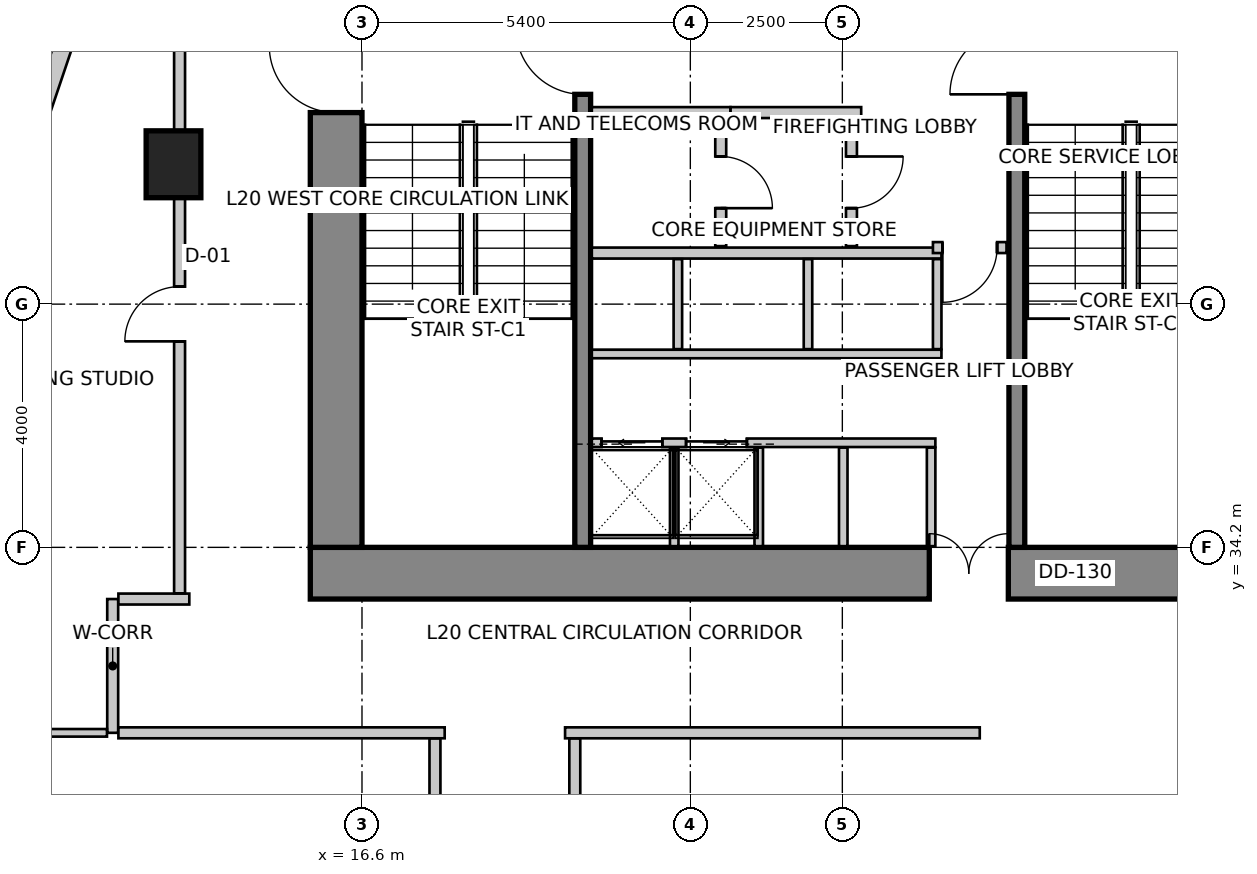
"""IFC4 building model, lengths in metres.
Left out: names, types, materials, properties, quantities, classifications, styles, units other than length and angle.
Written with IfcOpenShell. Run it as: python <this file> out.ifc"""

import sys

from ifc_helpers import new_model, si_unit, direction, frame, frame_2d, origin, origin_2d, place, context, subcontext, project, spatial, rectangle, extrude, source, transform, mapped, element, fill, save


model = new_model("IFC4")
c1 = context("Model", 3, precision=1e-05, world=origin(), true_north=direction((0.0, 1.0)))
c2 = subcontext(c1, "Body", "Model", "MODEL_VIEW")
j1 = project(units=[si_unit("LENGTHUNIT", "METRE"), si_unit("PLANEANGLEUNIT", "RADIAN")], contexts=[c1])
p1 = place(None, origin())
s1 = spatial("IfcSite", under=j1, at=p1, CompositionType="ELEMENT")
p2 = place(p1, origin())
s2 = spatial("IfcBuilding", under=s1, at=p2, CompositionType="ELEMENT")
p3 = place(p2, frame((0.0, 0.0, 83.0)))
s3 = spatial("IfcBuildingStorey", under=s2, at=p3, CompositionType="ELEMENT", Elevation=83.0)
p4 = place(p3, frame((15.75, 33.775, 0.0), z_axis=(0.0, 0.0, 1.0), x_axis=(1.0, 0.0, 0.0)))
e1 = element("IfcWall", 1, at=p4, inside=s3, PredefinedType="SHEAR", context=c2, shape_type="SweptSolid", body=[
    extrude(rectangle(XDim=16.1, YDim=0.85, at=frame_2d((8.05, 0.0))), origin(), (0.0, 0.0, 1.0), 4.0),
])
m1 = source(origin(), c2, "Body", "SweptSolid", [
    extrude(rectangle(XDim=1.3, YDim=2.15, at=frame_2d((0.65, 1.075))), frame((0.0, 0.435, 0.0), z_axis=(0.0, -1.0, 0.0), x_axis=(1.0, 0.0, 0.0)), (0.0, 0.0, 1.0), 0.87),
])
p5 = place(p4, frame((10.18, 0.0, 0.0)))
e2 = element("IfcOpeningElement", 2, at=p5, cuts=e1, PredefinedType="OPENING", context=c2, shape_type="MappedRepresentation", body=[
    mapped(m1, transform((0.0, 0.0, 0.0), scale=1.0)),
])
p6 = place(p3, frame((16.175, 34.2, 0.0), z_axis=(0.0, 0.0, 1.0), x_axis=(0.0, 1.0, 0.0)))
e3 = element("IfcWall", 3, at=p6, inside=s3, PredefinedType="SHEAR", context=c2, shape_type="SweptSolid", body=[
    extrude(rectangle(XDim=11.4, YDim=0.85, at=frame_2d((5.7, 0.0))), origin(), (0.0, 0.0, 1.0), 4.0),
])
m2 = source(origin(), c2, "Body", "SweptSolid", [
    extrude(rectangle(XDim=1.1, YDim=2.15, at=frame_2d((0.55, 1.075))), frame((0.0, 0.435, 0.0), z_axis=(0.0, -1.0, 0.0), x_axis=(1.0, 0.0, 0.0)), (0.0, 0.0, 1.0), 0.87),
])
p7 = place(p6, frame((7.15, 0.0, 0.0)))
e4 = element("IfcOpeningElement", 4, at=p7, cuts=e3, PredefinedType="OPENING", context=c2, shape_type="MappedRepresentation", body=[
    mapped(m2, transform((0.0, 0.0, 0.0), scale=1.0)),
])
p8 = place(p3, frame((20.23, 34.2, 0.0), z_axis=(0.0, 0.0, 1.0), x_axis=(0.0, 1.0, 0.0)))
e5 = element("IfcWall", 5, at=p8, inside=s3, PredefinedType="SHEAR", context=c2, shape_type="SweptSolid", body=[
    extrude(rectangle(XDim=9.06, YDim=0.26, at=frame_2d((4.53, 0.0))), origin(), (0.0, 0.0, 1.0), 4.0),
])
m3 = source(origin(), c2, "Body", "SweptSolid", [
    extrude(rectangle(XDim=1.1, YDim=2.15, at=frame_2d((0.55, 1.075))), frame((0.0, 0.14, 0.0), z_axis=(0.0, -1.0, 0.0), x_axis=(1.0, 0.0, 0.0)), (0.0, 0.0, 1.0), 0.28),
])
p9 = place(p8, frame((7.45, 0.0, 0.0)))
e6 = element("IfcOpeningElement", 6, at=p9, cuts=e5, PredefinedType="OPENING", context=c2, shape_type="MappedRepresentation", body=[
    mapped(m3, transform((0.0, 0.0, 0.0), scale=1.0)),
])
p10 = place(p3, frame((27.37, 34.2, 0.0), z_axis=(0.0, 0.0, 1.0), x_axis=(0.0, 1.0, 0.0)))
e7 = element("IfcWall", 7, at=p10, inside=s3, PredefinedType="SHEAR", context=c2, shape_type="SweptSolid", body=[
    extrude(rectangle(XDim=9.06, YDim=0.26, at=frame_2d((4.53, 0.0))), origin(), (0.0, 0.0, 1.0), 4.0),
])
p11 = place(p10, frame((7.45, 0.0, 0.0)))
e8 = element("IfcOpeningElement", 8, at=p11, cuts=e7, PredefinedType="OPENING", context=c2, shape_type="MappedRepresentation", body=[
    mapped(m3, transform((0.0, 0.0, 0.0), scale=1.0)),
])
m4 = source(origin(), c2, "Body", "SweptSolid", [
    extrude(rectangle(XDim=0.9, YDim=1.1, at=origin_2d()), origin(), (0.0, 0.0, 1.0), 4.0),
])
p12 = place(p3, frame((13.5, 40.5, 0.0), z_axis=(0.0, 0.0, 1.0), x_axis=(1.0, 0.0, 0.0)))
e9 = element("IfcColumn", 9, at=p12, inside=s3, PredefinedType="COLUMN", context=c2, shape_type="MappedRepresentation", body=[
    mapped(m4, transform((0.0, 0.0, 0.0), scale=1.0)),
])
p13 = place(p3, frame((13.269, 47.134, 0.0), z_axis=(0.0, 0.0, 1.0), x_axis=(-0.319920423265, -0.947444416722, 0.0)))
e10 = element("IfcWall", 10, at=p13, inside=s3, PredefinedType="SOLIDWALL", context=c2, shape_type="SweptSolid", body=[
    extrude(rectangle(XDim=16.135, YDim=0.3, at=frame_2d((8.067, 0.0))), origin(), (0.0, 0.0, 1.0), 3.75),
])
m5 = source(origin(), c2, "Body", "SweptSolid", [
    extrude(rectangle(XDim=2.8, YDim=2.4, at=frame_2d((1.4, 1.2))), frame((0.0, 0.16, 0.0), z_axis=(0.0, -1.0, 0.0), x_axis=(1.0, 0.0, 0.0)), (0.0, 0.0, 1.0), 0.32),
])
p14 = place(p13, frame((1.988, 0.0, 0.85)))
e11 = element("IfcOpeningElement", 11, at=p14, cuts=e10, PredefinedType="OPENING", context=c2, shape_type="MappedRepresentation", body=[
    mapped(m5, transform((0.0, 0.0, 0.0), scale=1.0)),
])
m6 = source(origin(), c2, "Body", "SweptSolid", [
    extrude(rectangle(XDim=2.4, YDim=2.2, at=frame_2d((1.2, 1.1))), frame((0.0, 0.16, 0.0), z_axis=(0.0, -1.0, 0.0), x_axis=(1.0, 0.0, 0.0)), (0.0, 0.0, 1.0), 0.32),
])
p15 = place(p13, frame((7.159, 0.0, 0.85)))
e12 = element("IfcOpeningElement", 12, at=p15, cuts=e10, PredefinedType="OPENING", context=c2, shape_type="MappedRepresentation", body=[
    mapped(m6, transform((0.0, 0.0, 0.0), scale=1.0)),
])
p16 = place(p13, frame((11.93, 0.0, 0.85)))
e13 = element("IfcOpeningElement", 13, at=p16, cuts=e10, PredefinedType="OPENING", context=c2, shape_type="MappedRepresentation", body=[
    mapped(m5, transform((0.0, 0.0, 0.0), scale=1.0)),
])
p17 = place(p3, frame((8.183, 31.833, 0.0), z_axis=(0.0, 0.0, 1.0), x_axis=(0.18216364648, -0.983268226834, 0.0)))
e14 = element("IfcWall", 14, at=p17, inside=s3, PredefinedType="SOLIDWALL", context=c2, shape_type="SweptSolid", body=[
    extrude(rectangle(XDim=26.678, YDim=0.3, at=frame_2d((13.339, 0.0))), origin(), (0.0, 0.0, 1.0), 3.75),
])
p18 = place(p17, frame((3.152, 0.0, 0.85)))
e15 = element("IfcOpeningElement", 15, at=p18, cuts=e14, PredefinedType="OPENING", context=c2, shape_type="MappedRepresentation", body=[
    mapped(m6, transform((0.0, 0.0, 0.0), scale=1.0)),
])
p19 = place(p17, frame((9.076, 0.0, 0.85)))
e16 = element("IfcOpeningElement", 16, at=p19, cuts=e14, PredefinedType="OPENING", context=c2, shape_type="MappedRepresentation", body=[
    mapped(m6, transform((0.0, 0.0, 0.0), scale=1.0)),
])
p20 = place(p17, frame((13.653, 0.0, 0.85)))
e17 = element("IfcOpeningElement", 17, at=p20, cuts=e14, PredefinedType="OPENING", context=c2, shape_type="MappedRepresentation", body=[
    mapped(m6, transform((0.0, 0.0, 0.0), scale=1.0)),
])
p21 = place(p17, frame((18.411, 0.0, 0.85)))
e18 = element("IfcOpeningElement", 18, at=p21, cuts=e14, PredefinedType="OPENING", context=c2, shape_type="MappedRepresentation", body=[
    mapped(m6, transform((0.0, 0.0, 0.0), scale=1.0)),
])
p22 = place(p17, frame((22.709, 0.0, 0.85)))
e19 = element("IfcOpeningElement", 19, at=p22, cuts=e14, PredefinedType="OPENING", context=c2, shape_type="MappedRepresentation", body=[
    mapped(m5, transform((0.0, 0.0, 0.0), scale=1.0)),
])
p23 = place(p3, frame((20.38, 35.92, 0.0), z_axis=(0.0, 0.0, 1.0), x_axis=(1.0, 0.0, 0.0)))
e20 = element("IfcWall", 20, at=p23, inside=s3, PredefinedType="SOLIDWALL", context=c2, shape_type="SweptSolid", body=[
    extrude(rectangle(XDim=5.65, YDim=0.14, at=frame_2d((2.825, 0.0))), origin(), (0.0, 0.0, 1.0), 3.75),
])
m7 = source(origin(), c2, "Body", "SweptSolid", [
    extrude(rectangle(XDim=1.0, YDim=2.15, at=frame_2d((0.5, 1.075))), frame((0.0, 0.08, 0.0), z_axis=(0.0, -1.0, 0.0), x_axis=(1.0, 0.0, 0.0)), (0.0, 0.0, 1.0), 0.16),
])
p24 = place(p23, frame((0.16, 0.0, 0.0)))
e21 = element("IfcOpeningElement", 21, at=p24, cuts=e20, PredefinedType="OPENING", context=c2, shape_type="MappedRepresentation", body=[
    mapped(m7, transform((0.0, 0.0, 0.0), scale=1.0)),
])
p25 = place(p23, frame((1.55, 0.0, 0.0)))
e22 = element("IfcOpeningElement", 22, at=p25, cuts=e20, PredefinedType="OPENING", context=c2, shape_type="MappedRepresentation", body=[
    mapped(m7, transform((0.0, 0.0, 0.0), scale=1.0)),
])
for number, where, z_axis, x_axis in (
    (23, (25.96, 34.22, 0.0), (0.0, 0.0, 1.0), (0.0, 1.0, 0.0)),
    (24, (21.735, 34.22, 0.0), (0.0, 0.0, 1.0), (0.0, 1.0, 0.0)),
    (25, (23.125, 34.22, 0.0), (0.0, 0.0, 1.0), (0.0, 1.0, 0.0)),
    (26, (24.515, 34.22, 0.0), (0.0, 0.0, 1.0), (0.0, 1.0, 0.0)),
):
    element("IfcWall", number, at=place(p3, frame(where, z_axis=z_axis, x_axis=x_axis)), inside=s3, PredefinedType="SOLIDWALL", context=c2, shape_type="SweptSolid", body=[
        extrude(rectangle(XDim=1.62, YDim=0.14, at=frame_2d((0.81, 0.0))), origin(), (0.0, 0.0, 1.0), 3.042),
    ])
p26 = place(p3, frame((20.38, 37.38, 0.0), z_axis=(0.0, 0.0, 1.0), x_axis=(1.0, 0.0, 0.0)))
e27 = element("IfcWall", 27, at=p26, inside=s3, PredefinedType="SOLIDWALL", context=c2, shape_type="SweptSolid", body=[
    extrude(rectangle(XDim=5.75, YDim=0.14, at=frame_2d((2.875, 0.0))), origin(), (0.0, 0.0, 1.0), 3.75),
])
p27 = place(p3, frame((20.38, 39.04, 0.0), z_axis=(0.0, 0.0, 1.0), x_axis=(1.0, 0.0, 0.0)))
e28 = element("IfcWall", 28, at=p27, inside=s3, PredefinedType="SOLIDWALL", context=c2, shape_type="SweptSolid", body=[
    extrude(rectangle(XDim=5.75, YDim=0.18, at=frame_2d((2.875, 0.0))), origin(), (0.0, 0.0, 1.0), 3.75),
])
for number, where, z_axis, x_axis in (
    (29, (26.06, 37.46, 0.0), (0.0, 0.0, 1.0), (0.0, 1.0, 0.0)),
    (30, (21.795, 37.46, 0.0), (0.0, 0.0, 1.0), (0.0, 1.0, 0.0)),
    (31, (23.935, 37.46, 0.0), (0.0, 0.0, 1.0), (0.0, 1.0, 0.0)),
):
    element("IfcWall", number, at=place(p3, frame(where, z_axis=z_axis, x_axis=x_axis)), inside=s3, PredefinedType="SOLIDWALL", context=c2, shape_type="SweptSolid", body=[
        extrude(rectangle(XDim=1.48, YDim=0.14, at=frame_2d((0.74, 0.0))), origin(), (0.0, 0.0, 1.0), 3.75),
    ])
p28 = place(p3, frame((22.66, 41.35, 0.0), z_axis=(0.0, 0.0, 1.0), x_axis=(-1.0, 0.0, 0.0)))
e32 = element("IfcWall", 32, at=p28, inside=s3, PredefinedType="PARTITIONING", context=c2, shape_type="SweptSolid", body=[
    extrude(rectangle(XDim=2.28, YDim=0.18, at=frame_2d((1.14, 0.0))), origin(), (0.0, 0.0, 1.0), 3.75),
])
p29 = place(p3, frame((24.81, 41.35, 0.0), z_axis=(0.0, 0.0, 1.0), x_axis=(-1.0, 0.0, 0.0)))
e33 = element("IfcWall", 33, at=p29, inside=s3, PredefinedType="PARTITIONING", context=c2, shape_type="SweptSolid", body=[
    extrude(rectangle(XDim=2.148, YDim=0.18, at=frame_2d((1.074, 0.0))), origin(), (0.0, 0.0, 1.0), 3.75),
])
p30 = place(p3, frame((22.5, 41.256, 0.0), z_axis=(0.0, 0.0, 1.0), x_axis=(0.0, -1.0, 0.0)))
e34 = element("IfcWall", 34, at=p30, inside=s3, PredefinedType="PARTITIONING", context=c2, shape_type="SweptSolid", body=[
    extrude(rectangle(XDim=2.106, YDim=0.18, at=frame_2d((1.053, 0.0))), origin(), (0.0, 0.0, 1.0), 3.75),
])
m8 = source(origin(), c2, "Body", "SweptSolid", [
    extrude(rectangle(XDim=0.85, YDim=2.15, at=frame_2d((0.425, 1.075))), frame((0.0, 0.1, 0.0), z_axis=(0.0, -1.0, 0.0), x_axis=(1.0, 0.0, 0.0)), (0.0, 0.0, 1.0), 0.2),
])
p31 = place(p30, frame((0.628, 0.0, 0.0)))
e35 = element("IfcOpeningElement", 35, at=p31, cuts=e34, PredefinedType="OPENING", context=c2, shape_type="MappedRepresentation", body=[
    mapped(m8, transform((0.0, 0.0, 0.0), scale=1.0)),
])
p32 = place(p3, frame((24.65, 41.256, 0.0), z_axis=(0.0, 0.0, 1.0), x_axis=(0.0, -1.0, 0.0)))
e36 = element("IfcWall", 36, at=p32, inside=s3, PredefinedType="PARTITIONING", context=c2, shape_type="SweptSolid", body=[
    extrude(rectangle(XDim=2.106, YDim=0.18, at=frame_2d((1.053, 0.0))), origin(), (0.0, 0.0, 1.0), 3.75),
])
p33 = place(p32, frame((0.628, 0.0, 0.0)))
e37 = element("IfcOpeningElement", 37, at=p33, cuts=e36, PredefinedType="OPENING", context=c2, shape_type="MappedRepresentation", body=[
    mapped(m8, transform((0.0, 0.0, 0.0), scale=1.0)),
])
p34 = place(p3, frame((27.2, 39.13, 0.0), z_axis=(0.0, 0.0, 1.0), x_axis=(-1.0, 0.0, 0.0)))
e38 = element("IfcWall", 38, at=p34, inside=s3, PredefinedType="PARTITIONING", context=c2, shape_type="SweptSolid", body=[
    extrude(rectangle(XDim=1.21, YDim=0.18, at=frame_2d((0.605, 0.0))), origin(), (0.0, 0.0, 1.0), 3.75),
])
m9 = source(origin(), c2, "Body", "SweptSolid", [
    extrude(rectangle(XDim=0.9, YDim=2.15, at=frame_2d((0.45, 1.075))), frame((0.0, 0.1, 0.0), z_axis=(0.0, -1.0, 0.0), x_axis=(1.0, 0.0, 0.0)), (0.0, 0.0, 1.0), 0.2),
])
p35 = place(p34, frame((0.155, 0.0, 0.0)))
e39 = element("IfcOpeningElement", 39, at=p35, cuts=e38, PredefinedType="OPENING", context=c2, shape_type="MappedRepresentation", body=[
    mapped(m9, transform((0.0, 0.0, 0.0), scale=1.0)),
])
p36 = place(p3, frame((12.5, 31.15, 0.0), z_axis=(0.0, 0.0, 1.0), x_axis=(0.0, 1.0, 0.0)))
e40 = element("IfcWall", 40, at=p36, inside=s3, PredefinedType="PARTITIONING", context=c2, shape_type="SweptSolid", body=[
    extrude(rectangle(XDim=2.2, YDim=0.18, at=frame_2d((1.1, 0.0))), origin(), (0.0, 0.0, 1.0), 3.434),
])
p37 = place(p3, frame((12.594, 33.35, 0.0), z_axis=(0.0, 0.0, 1.0), x_axis=(1.0, 0.0, 0.0)))
e41 = element("IfcWall", 41, at=p37, inside=s3, PredefinedType="PARTITIONING", context=c2, shape_type="SweptSolid", body=[
    extrude(rectangle(XDim=1.166, YDim=0.18, at=frame_2d((0.583, 0.0))), origin(), (0.0, 0.0, 1.0), 3.75),
])
p38 = place(p3, frame((17.96, 31.15, 0.0), z_axis=(0.0, 0.0, 1.0), x_axis=(-1.0, 0.0, 0.0)))
e42 = element("IfcWall", 42, at=p38, inside=s3, PredefinedType="PARTITIONING", context=c2, shape_type="SweptSolid", body=[
    extrude(rectangle(XDim=5.366, YDim=0.18, at=frame_2d((2.683, 0.0))), origin(), (0.0, 0.0, 1.0), 3.434),
])
p39 = place(p3, frame((26.76, 31.15, 0.0), z_axis=(0.0, 0.0, 1.0), x_axis=(-1.0, 0.0, 0.0)))
e43 = element("IfcWall", 43, at=p39, inside=s3, PredefinedType="PARTITIONING", context=c2, shape_type="SweptSolid", body=[
    extrude(rectangle(XDim=6.82, YDim=0.18, at=frame_2d((3.41, 0.0))), origin(), (0.0, 0.0, 1.0), 3.434),
])
p40 = place(p3, frame((13.6, 33.444, 0.0), z_axis=(0.0, 0.0, 1.0), x_axis=(0.0, 1.0, 0.0)))
e44 = element("IfcWall", 44, at=p40, inside=s3, PredefinedType="PARTITIONING", context=c2, shape_type="SweptSolid", body=[
    extrude(rectangle(XDim=13.896, YDim=0.18, at=frame_2d((6.948, 0.0))), origin(), (0.0, 0.0, 1.0), 2.892),
])
p41 = place(p40, frame((4.144, 0.0, 0.0)))
e45 = element("IfcOpeningElement", 45, at=p41, cuts=e44, PredefinedType="OPENING", context=c2, shape_type="MappedRepresentation", body=[
    mapped(m9, transform((0.0, 0.0, 0.0), scale=1.0)),
])
p42 = place(p3, frame((12.406, 31.15, 0.0), z_axis=(0.0, 0.0, 1.0), x_axis=(-1.0, 0.0, 0.0)))
e46 = element("IfcWall", 46, at=p42, inside=s3, PredefinedType="PARTITIONING", context=c2, shape_type="SweptSolid", body=[
    extrude(rectangle(XDim=3.979, YDim=0.125, at=frame_2d((1.99, 0.0))), origin(), (0.0, 0.0, 1.0), 2.892),
])
p43 = place(p3, frame((17.8, 24.162, 0.0), z_axis=(0.0, 0.0, 1.0), x_axis=(0.0, 1.0, 0.0)))
e47 = element("IfcWall", 47, at=p43, inside=s3, PredefinedType="PARTITIONING", context=c2, shape_type="SweptSolid", body=[
    extrude(rectangle(XDim=6.894, YDim=0.18, at=frame_2d((3.447, 0.0))), origin(), (0.0, 0.0, 1.0), 3.125),
])
p44 = place(p43, frame((2.937, 0.0, 0.0)))
e48 = element("IfcOpeningElement", 48, at=p44, cuts=e47, PredefinedType="OPENING", context=c2, shape_type="MappedRepresentation", body=[
    mapped(m9, transform((0.0, 0.0, 0.0), scale=1.0)),
])
p45 = place(p3, frame((20.1, 31.056, 0.0), z_axis=(0.0, 0.0, 1.0), x_axis=(0.0, -1.0, 0.0)))
e49 = element("IfcWall", 49, at=p45, inside=s3, PredefinedType="PARTITIONING", context=c2, shape_type="SweptSolid", body=[
    extrude(rectangle(XDim=6.894, YDim=0.18, at=frame_2d((3.447, 0.0))), origin(), (0.0, 0.0, 1.0), 3.125),
])
p46 = place(p45, frame((2.937, 0.0, 0.0)))
e50 = element("IfcOpeningElement", 50, at=p46, cuts=e49, PredefinedType="OPENING", context=c2, shape_type="MappedRepresentation", body=[
    mapped(m9, transform((0.0, 0.0, 0.0), scale=1.0)),
])
m10 = source(origin(), c2, "Body", "SweptSolid", [
    extrude(rectangle(XDim=1.0, YDim=2.15, at=frame_2d((0.5, 1.075))), frame((0.0, 0.025, 0.0), z_axis=(0.0, -1.0, 0.0), x_axis=(1.0, 0.0, 0.0)), (0.0, 0.0, 1.0), 0.05),
])
p47 = place(p24, origin())
e51 = element("IfcDoor", 51, at=p47, inside=s3, OperationType="SLIDING_TO_LEFT", PredefinedType="DOOR", context=c2, shape_type="MappedRepresentation", body=[
    mapped(m10, transform((0.0, 0.0, 0.0), scale=1.0)),
])
fill(e21, e51)
p48 = place(p25, origin())
e52 = element("IfcDoor", 52, at=p48, inside=s3, OperationType="SLIDING_TO_RIGHT", PredefinedType="DOOR", context=c2, shape_type="MappedRepresentation", body=[
    mapped(m10, transform((0.0, 0.0, 0.0), scale=1.0)),
])
fill(e22, e52)
m11 = source(origin(), c2, "Body", "SweptSolid", [
    extrude(rectangle(XDim=1.1, YDim=2.15, at=frame_2d((0.55, 1.075))), frame((0.0, 0.025, 0.0), z_axis=(0.0, -1.0, 0.0), x_axis=(1.0, 0.0, 0.0)), (0.0, 0.0, 1.0), 0.05),
])
p49 = place(p9, origin())
e53 = element("IfcDoor", 53, at=p49, inside=s3, OperationType="SINGLE_SWING_RIGHT", PredefinedType="DOOR", context=c2, shape_type="MappedRepresentation", body=[
    mapped(m11, transform((0.0, 0.0, 0.0), scale=1.0)),
])
fill(e6, e53)
p50 = place(p11, origin())
e54 = element("IfcDoor", 54, at=p50, inside=s3, OperationType="SINGLE_SWING_LEFT", PredefinedType="DOOR", context=c2, shape_type="MappedRepresentation", body=[
    mapped(m11, transform((0.0, 0.0, 0.0), scale=1.0)),
])
fill(e8, e54)
p51 = place(p7, origin())
e55 = element("IfcDoor", 55, at=p51, inside=s3, OperationType="SINGLE_SWING_RIGHT", PredefinedType="DOOR", context=c2, shape_type="MappedRepresentation", body=[
    mapped(m11, transform((0.0, 0.0, 0.0), scale=1.0)),
])
fill(e4, e55)
m12 = source(origin(), c2, "Body", "SweptSolid", [
    extrude(rectangle(XDim=1.3, YDim=2.15, at=frame_2d((0.65, 1.075))), frame((0.0, 0.025, 0.0), z_axis=(0.0, -1.0, 0.0), x_axis=(1.0, 0.0, 0.0)), (0.0, 0.0, 1.0), 0.05),
])
p52 = place(p5, origin())
e56 = element("IfcDoor", 56, at=p52, inside=s3, OperationType="DOUBLE_DOOR_SINGLE_SWING", PredefinedType="DOOR", context=c2, shape_type="MappedRepresentation", body=[
    mapped(m12, transform((0.0, 0.0, 0.0), scale=1.0)),
])
fill(e2, e56)
m13 = source(origin(), c2, "Body", "SweptSolid", [
    extrude(rectangle(XDim=0.85, YDim=2.15, at=frame_2d((0.425, 1.075))), frame((0.0, 0.025, 0.0), z_axis=(0.0, -1.0, 0.0), x_axis=(1.0, 0.0, 0.0)), (0.0, 0.0, 1.0), 0.05),
])
p53 = place(p31, origin())
e57 = element("IfcDoor", 57, at=p53, inside=s3, OperationType="SINGLE_SWING_RIGHT", PredefinedType="DOOR", context=c2, shape_type="MappedRepresentation", body=[
    mapped(m13, transform((0.0, 0.0, 0.0), scale=1.0)),
])
fill(e35, e57)
p54 = place(p33, origin())
e58 = element("IfcDoor", 58, at=p54, inside=s3, OperationType="SINGLE_SWING_LEFT", PredefinedType="DOOR", context=c2, shape_type="MappedRepresentation", body=[
    mapped(m13, transform((0.0, 0.0, 0.0), scale=1.0)),
])
fill(e37, e58)
m14 = source(origin(), c2, "Body", "SweptSolid", [
    extrude(rectangle(XDim=0.9, YDim=2.15, at=frame_2d((0.45, 1.075))), frame((0.0, 0.025, 0.0), z_axis=(0.0, -1.0, 0.0), x_axis=(1.0, 0.0, 0.0)), (0.0, 0.0, 1.0), 0.05),
])
p55 = place(p35, origin())
e59 = element("IfcDoor", 59, at=p55, inside=s3, OperationType="SINGLE_SWING_RIGHT", PredefinedType="DOOR", context=c2, shape_type="MappedRepresentation", body=[
    mapped(m14, transform((0.0, 0.0, 0.0), scale=1.0)),
])
fill(e39, e59)
m15 = source(origin(), c2, "Body", "SweptSolid", [
    extrude(rectangle(XDim=0.9, YDim=2.15, at=frame_2d((0.45, 1.075))), frame((0.0, 0.025, 0.0), z_axis=(0.0, -1.0, 0.0), x_axis=(1.0, 0.0, 0.0)), (0.0, 0.0, 1.0), 0.05),
])
p56 = place(p41, origin())
e60 = element("IfcDoor", 60, at=p56, inside=s3, OperationType="SINGLE_SWING_LEFT", PredefinedType="DOOR", context=c2, shape_type="MappedRepresentation", body=[
    mapped(m15, transform((0.0, 0.0, 0.0), scale=1.0)),
])
fill(e45, e60)
save(model, sys.argv[1])
